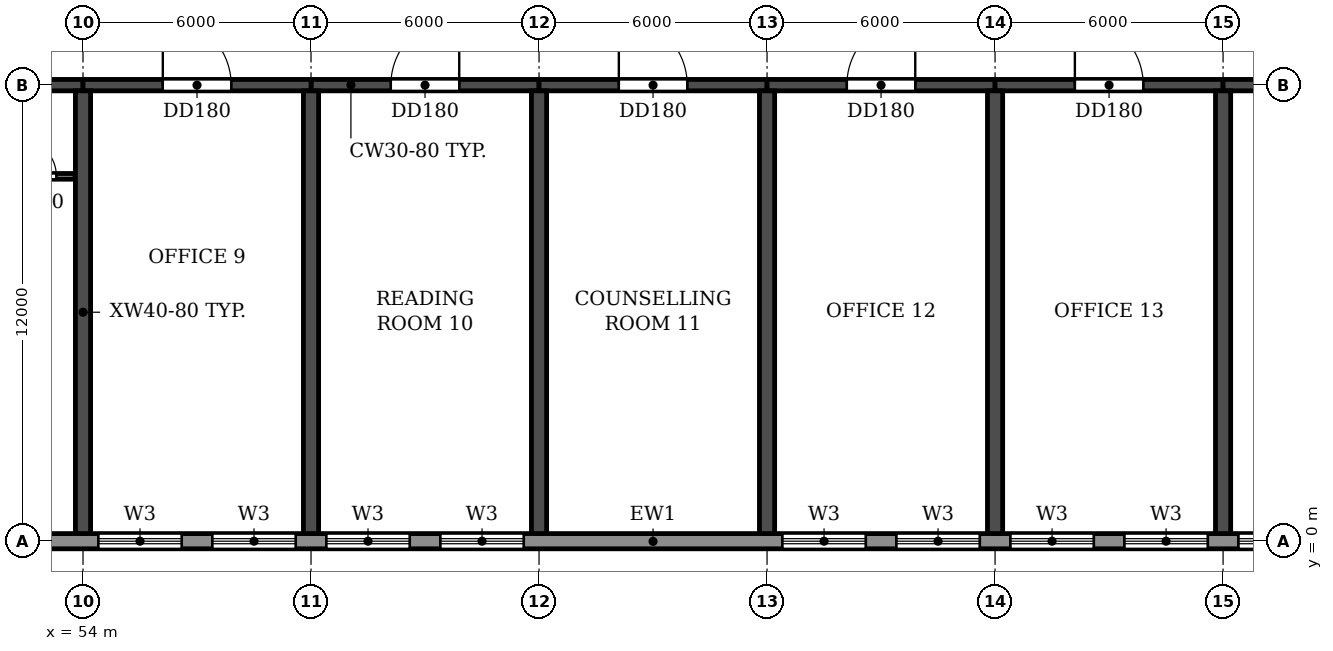
"""IFC4 building model, lengths in metres.
Left out: names, types, materials, properties, quantities, classifications, styles, units other than length and angle.
Written with IfcOpenShell. Run it as: python <this file> out.ifc"""

import sys

from ifc_helpers import new_model, si_unit, direction, frame, frame_2d, origin, place, context, subcontext, project, spatial, rectangle, extrude, element, fill, save


model = new_model("IFC4")
c1 = context("Model", 3, precision=1e-05, world=origin(), true_north=direction((0.0, 1.0)))
c2 = subcontext(c1, "Body", "Model", "MODEL_VIEW")
j1 = project(units=[si_unit("LENGTHUNIT", "METRE"), si_unit("PLANEANGLEUNIT", "RADIAN")], contexts=[c1])
p1 = place(None, origin())
s1 = spatial("IfcSite", under=j1, at=p1, CompositionType="ELEMENT")
p2 = place(p1, origin())
s2 = spatial("IfcBuilding", under=s1, at=p2, CompositionType="ELEMENT")
p3 = place(p2, frame((0.0, 0.0, 53.1)))
s3 = spatial("IfcBuildingStorey", under=s2, at=p3, CompositionType="ELEMENT", Elevation=53.1)
for number, where, z_axis, x_axis in (
    (1, (54.0, 0.2, 0.0), (0.0, 0.0, 1.0), (0.0, 1.0, 0.0)),
    (2, (60.0, 0.2, 0.0), (0.0, 0.0, 1.0), (0.0, 1.0, 0.0)),
    (3, (66.0, 0.2, 0.0), (0.0, 0.0, 1.0), (0.0, 1.0, 0.0)),
    (4, (72.0, 0.2, 0.0), (0.0, 0.0, 1.0), (0.0, 1.0, 0.0)),
    (5, (78.0, 0.2, 0.0), (0.0, 0.0, 1.0), (0.0, 1.0, 0.0)),
    (6, (84.0, 0.2, 0.0), (0.0, 0.0, 1.0), (0.0, 1.0, 0.0)),
):
    element("IfcWall", number, at=place(p3, frame(where, z_axis=z_axis, x_axis=x_axis)), inside=s3, PredefinedType="SHEAR", context=c2, shape_type="SweptSolid", body=[
        extrude(rectangle(XDim=11.65, YDim=0.4, at=frame_2d((5.825, 0.0))), origin(), (0.0, 0.0, 1.0), 3.05),
    ])
p4 = place(p3, frame((48.0, 12.0, 0.0), z_axis=(0.0, 0.0, 1.0), x_axis=(1.0, 0.0, 0.0)))
e7 = element("IfcWall", 7, at=p4, inside=s3, PredefinedType="SHEAR", context=c2, shape_type="SweptSolid", body=[
    extrude(rectangle(XDim=6.0, YDim=0.3, at=frame_2d((3.0, 0.0))), origin(), (0.0, 0.0, 1.0), 2.45),
])
p5 = place(p4, frame((2.55, 0.0, 0.0)))
e8 = element("IfcOpeningElement", 8, at=p5, cuts=e7, PredefinedType="OPENING", context=c2, shape_type="SweptSolid", body=[
    extrude(rectangle(XDim=0.9, YDim=2.1, at=frame_2d((0.45, 1.05))), frame((0.0, 0.16, 0.0), z_axis=(0.0, -1.0, 0.0), x_axis=(1.0, 0.0, 0.0)), (0.0, 0.0, 1.0), 0.32),
])
p6 = place(p3, frame((54.0, 12.0, 0.0), z_axis=(0.0, 0.0, 1.0), x_axis=(1.0, 0.0, 0.0)))
e9 = element("IfcWall", 9, at=p6, inside=s3, PredefinedType="SHEAR", context=c2, shape_type="SweptSolid", body=[
    extrude(rectangle(XDim=6.0, YDim=0.3, at=frame_2d((3.0, 0.0))), origin(), (0.0, 0.0, 1.0), 2.45),
])
p7 = place(p6, frame((2.1, 0.0, 0.0)))
e10 = element("IfcOpeningElement", 10, at=p7, cuts=e9, PredefinedType="OPENING", context=c2, shape_type="SweptSolid", body=[
    extrude(rectangle(XDim=1.8, YDim=2.1, at=frame_2d((0.9, 1.05))), frame((0.0, 0.16, 0.0), z_axis=(0.0, -1.0, 0.0), x_axis=(1.0, 0.0, 0.0)), (0.0, 0.0, 1.0), 0.32),
])
p8 = place(p3, frame((60.0, 12.0, 0.0), z_axis=(0.0, 0.0, 1.0), x_axis=(1.0, 0.0, 0.0)))
e11 = element("IfcWall", 11, at=p8, inside=s3, PredefinedType="SHEAR", context=c2, shape_type="SweptSolid", body=[
    extrude(rectangle(XDim=6.0, YDim=0.3, at=frame_2d((3.0, 0.0))), origin(), (0.0, 0.0, 1.0), 2.45),
])
p9 = place(p8, frame((2.1, 0.0, 0.0)))
e12 = element("IfcOpeningElement", 12, at=p9, cuts=e11, PredefinedType="OPENING", context=c2, shape_type="SweptSolid", body=[
    extrude(rectangle(XDim=1.8, YDim=2.1, at=frame_2d((0.9, 1.05))), frame((0.0, 0.16, 0.0), z_axis=(0.0, -1.0, 0.0), x_axis=(1.0, 0.0, 0.0)), (0.0, 0.0, 1.0), 0.32),
])
p10 = place(p3, frame((66.0, 12.0, 0.0), z_axis=(0.0, 0.0, 1.0), x_axis=(1.0, 0.0, 0.0)))
e13 = element("IfcWall", 13, at=p10, inside=s3, PredefinedType="SHEAR", context=c2, shape_type="SweptSolid", body=[
    extrude(rectangle(XDim=6.0, YDim=0.3, at=frame_2d((3.0, 0.0))), origin(), (0.0, 0.0, 1.0), 2.45),
])
p11 = place(p10, frame((2.1, 0.0, 0.0)))
e14 = element("IfcOpeningElement", 14, at=p11, cuts=e13, PredefinedType="OPENING", context=c2, shape_type="SweptSolid", body=[
    extrude(rectangle(XDim=1.8, YDim=2.1, at=frame_2d((0.9, 1.05))), frame((0.0, 0.16, 0.0), z_axis=(0.0, -1.0, 0.0), x_axis=(1.0, 0.0, 0.0)), (0.0, 0.0, 1.0), 0.32),
])
p12 = place(p3, frame((72.0, 12.0, 0.0), z_axis=(0.0, 0.0, 1.0), x_axis=(1.0, 0.0, 0.0)))
e15 = element("IfcWall", 15, at=p12, inside=s3, PredefinedType="SHEAR", context=c2, shape_type="SweptSolid", body=[
    extrude(rectangle(XDim=6.0, YDim=0.3, at=frame_2d((3.0, 0.0))), origin(), (0.0, 0.0, 1.0), 2.45),
])
p13 = place(p12, frame((2.1, 0.0, 0.0)))
e16 = element("IfcOpeningElement", 16, at=p13, cuts=e15, PredefinedType="OPENING", context=c2, shape_type="SweptSolid", body=[
    extrude(rectangle(XDim=1.8, YDim=2.1, at=frame_2d((0.9, 1.05))), frame((0.0, 0.16, 0.0), z_axis=(0.0, -1.0, 0.0), x_axis=(1.0, 0.0, 0.0)), (0.0, 0.0, 1.0), 0.32),
])
p14 = place(p3, frame((78.0, 12.0, 0.0), z_axis=(0.0, 0.0, 1.0), x_axis=(1.0, 0.0, 0.0)))
e17 = element("IfcWall", 17, at=p14, inside=s3, PredefinedType="SHEAR", context=c2, shape_type="SweptSolid", body=[
    extrude(rectangle(XDim=6.0, YDim=0.3, at=frame_2d((3.0, 0.0))), origin(), (0.0, 0.0, 1.0), 2.45),
])
p15 = place(p14, frame((2.1, 0.0, 0.0)))
e18 = element("IfcOpeningElement", 18, at=p15, cuts=e17, PredefinedType="OPENING", context=c2, shape_type="SweptSolid", body=[
    extrude(rectangle(XDim=1.8, YDim=2.1, at=frame_2d((0.9, 1.05))), frame((0.0, 0.16, 0.0), z_axis=(0.0, -1.0, 0.0), x_axis=(1.0, 0.0, 0.0)), (0.0, 0.0, 1.0), 0.32),
])
p16 = place(p3, frame((84.0, 12.0, 0.0), z_axis=(0.0, 0.0, 1.0), x_axis=(1.0, 0.0, 0.0)))
e19 = element("IfcWall", 19, at=p16, inside=s3, PredefinedType="SHEAR", context=c2, shape_type="SweptSolid", body=[
    extrude(rectangle(XDim=6.0, YDim=0.3, at=frame_2d((3.0, 0.0))), origin(), (0.0, 0.0, 1.0), 2.45),
])
p17 = place(p16, frame((2.1, 0.0, 0.0)))
e20 = element("IfcOpeningElement", 20, at=p17, cuts=e19, PredefinedType="OPENING", context=c2, shape_type="SweptSolid", body=[
    extrude(rectangle(XDim=1.8, YDim=2.1, at=frame_2d((0.9, 1.05))), frame((0.0, 0.16, 0.0), z_axis=(0.0, -1.0, 0.0), x_axis=(1.0, 0.0, 0.0)), (0.0, 0.0, 1.0), 0.32),
])
p18 = place(p3, frame((10.683, 0.0, 0.0), z_axis=(0.0, 0.0, 1.0), x_axis=(1.0, 0.0, 0.0)))
e21 = element("IfcWall", 21, at=p18, inside=s3, PredefinedType="STANDARD", context=c2, shape_type="SweptSolid", body=[
    extrude(rectangle(XDim=80.634, YDim=0.4, at=frame_2d((40.317, 0.0))), origin(), (0.0, 0.0, 1.0), 3.05),
])
p19 = place(p18, frame((1.717, 0.0, 0.6)))
e22 = element("IfcOpeningElement", 22, at=p19, cuts=e21, PredefinedType="OPENING", context=c2, shape_type="SweptSolid", body=[
    extrude(rectangle(XDim=2.2, YDim=1.8, at=frame_2d((1.1, 0.9))), frame((0.0, 0.21, 0.0), z_axis=(0.0, -1.0, 0.0), x_axis=(1.0, 0.0, 0.0)), (0.0, 0.0, 1.0), 0.42),
])
p20 = place(p18, frame((4.717, 0.0, 0.6)))
e23 = element("IfcOpeningElement", 23, at=p20, cuts=e21, PredefinedType="OPENING", context=c2, shape_type="SweptSolid", body=[
    extrude(rectangle(XDim=2.2, YDim=1.8, at=frame_2d((1.1, 0.9))), frame((0.0, 0.21, 0.0), z_axis=(0.0, -1.0, 0.0), x_axis=(1.0, 0.0, 0.0)), (0.0, 0.0, 1.0), 0.42),
])
p21 = place(p18, frame((7.717, 0.0, 0.6)))
e24 = element("IfcOpeningElement", 24, at=p21, cuts=e21, PredefinedType="OPENING", context=c2, shape_type="SweptSolid", body=[
    extrude(rectangle(XDim=2.2, YDim=1.8, at=frame_2d((1.1, 0.9))), frame((0.0, 0.21, 0.0), z_axis=(0.0, -1.0, 0.0), x_axis=(1.0, 0.0, 0.0)), (0.0, 0.0, 1.0), 0.42),
])
p22 = place(p18, frame((10.717, 0.0, 0.6)))
e25 = element("IfcOpeningElement", 25, at=p22, cuts=e21, PredefinedType="OPENING", context=c2, shape_type="SweptSolid", body=[
    extrude(rectangle(XDim=2.2, YDim=1.8, at=frame_2d((1.1, 0.9))), frame((0.0, 0.21, 0.0), z_axis=(0.0, -1.0, 0.0), x_axis=(1.0, 0.0, 0.0)), (0.0, 0.0, 1.0), 0.42),
])
p23 = place(p18, frame((13.717, 0.0, 0.6)))
e26 = element("IfcOpeningElement", 26, at=p23, cuts=e21, PredefinedType="OPENING", context=c2, shape_type="SweptSolid", body=[
    extrude(rectangle(XDim=2.2, YDim=1.8, at=frame_2d((1.1, 0.9))), frame((0.0, 0.21, 0.0), z_axis=(0.0, -1.0, 0.0), x_axis=(1.0, 0.0, 0.0)), (0.0, 0.0, 1.0), 0.42),
])
p24 = place(p18, frame((16.717, 0.0, 0.6)))
e27 = element("IfcOpeningElement", 27, at=p24, cuts=e21, PredefinedType="OPENING", context=c2, shape_type="SweptSolid", body=[
    extrude(rectangle(XDim=2.2, YDim=1.8, at=frame_2d((1.1, 0.9))), frame((0.0, 0.21, 0.0), z_axis=(0.0, -1.0, 0.0), x_axis=(1.0, 0.0, 0.0)), (0.0, 0.0, 1.0), 0.42),
])
p25 = place(p18, frame((19.717, 0.0, 0.6)))
e28 = element("IfcOpeningElement", 28, at=p25, cuts=e21, PredefinedType="OPENING", context=c2, shape_type="SweptSolid", body=[
    extrude(rectangle(XDim=2.2, YDim=1.8, at=frame_2d((1.1, 0.9))), frame((0.0, 0.21, 0.0), z_axis=(0.0, -1.0, 0.0), x_axis=(1.0, 0.0, 0.0)), (0.0, 0.0, 1.0), 0.42),
])
p26 = place(p18, frame((22.717, 0.0, 0.6)))
e29 = element("IfcOpeningElement", 29, at=p26, cuts=e21, PredefinedType="OPENING", context=c2, shape_type="SweptSolid", body=[
    extrude(rectangle(XDim=2.2, YDim=1.8, at=frame_2d((1.1, 0.9))), frame((0.0, 0.21, 0.0), z_axis=(0.0, -1.0, 0.0), x_axis=(1.0, 0.0, 0.0)), (0.0, 0.0, 1.0), 0.42),
])
p27 = place(p18, frame((25.717, 0.0, 0.6)))
e30 = element("IfcOpeningElement", 30, at=p27, cuts=e21, PredefinedType="OPENING", context=c2, shape_type="SweptSolid", body=[
    extrude(rectangle(XDim=2.2, YDim=1.8, at=frame_2d((1.1, 0.9))), frame((0.0, 0.21, 0.0), z_axis=(0.0, -1.0, 0.0), x_axis=(1.0, 0.0, 0.0)), (0.0, 0.0, 1.0), 0.42),
])
p28 = place(p18, frame((28.717, 0.0, 0.6)))
e31 = element("IfcOpeningElement", 31, at=p28, cuts=e21, PredefinedType="OPENING", context=c2, shape_type="SweptSolid", body=[
    extrude(rectangle(XDim=2.2, YDim=1.8, at=frame_2d((1.1, 0.9))), frame((0.0, 0.21, 0.0), z_axis=(0.0, -1.0, 0.0), x_axis=(1.0, 0.0, 0.0)), (0.0, 0.0, 1.0), 0.42),
])
p29 = place(p18, frame((31.717, 0.0, 0.6)))
e32 = element("IfcOpeningElement", 32, at=p29, cuts=e21, PredefinedType="OPENING", context=c2, shape_type="SweptSolid", body=[
    extrude(rectangle(XDim=2.2, YDim=1.8, at=frame_2d((1.1, 0.9))), frame((0.0, 0.21, 0.0), z_axis=(0.0, -1.0, 0.0), x_axis=(1.0, 0.0, 0.0)), (0.0, 0.0, 1.0), 0.42),
])
p30 = place(p18, frame((34.717, 0.0, 0.6)))
e33 = element("IfcOpeningElement", 33, at=p30, cuts=e21, PredefinedType="OPENING", context=c2, shape_type="SweptSolid", body=[
    extrude(rectangle(XDim=2.2, YDim=1.8, at=frame_2d((1.1, 0.9))), frame((0.0, 0.21, 0.0), z_axis=(0.0, -1.0, 0.0), x_axis=(1.0, 0.0, 0.0)), (0.0, 0.0, 1.0), 0.42),
])
p31 = place(p18, frame((43.717, 0.0, 0.6)))
e34 = element("IfcOpeningElement", 34, at=p31, cuts=e21, PredefinedType="OPENING", context=c2, shape_type="SweptSolid", body=[
    extrude(rectangle(XDim=2.2, YDim=1.8, at=frame_2d((1.1, 0.9))), frame((0.0, 0.21, 0.0), z_axis=(0.0, -1.0, 0.0), x_axis=(1.0, 0.0, 0.0)), (0.0, 0.0, 1.0), 0.42),
])
p32 = place(p18, frame((46.717, 0.0, 0.6)))
e35 = element("IfcOpeningElement", 35, at=p32, cuts=e21, PredefinedType="OPENING", context=c2, shape_type="SweptSolid", body=[
    extrude(rectangle(XDim=2.2, YDim=1.8, at=frame_2d((1.1, 0.9))), frame((0.0, 0.21, 0.0), z_axis=(0.0, -1.0, 0.0), x_axis=(1.0, 0.0, 0.0)), (0.0, 0.0, 1.0), 0.42),
])
p33 = place(p18, frame((49.717, 0.0, 0.6)))
e36 = element("IfcOpeningElement", 36, at=p33, cuts=e21, PredefinedType="OPENING", context=c2, shape_type="SweptSolid", body=[
    extrude(rectangle(XDim=2.2, YDim=1.8, at=frame_2d((1.1, 0.9))), frame((0.0, 0.21, 0.0), z_axis=(0.0, -1.0, 0.0), x_axis=(1.0, 0.0, 0.0)), (0.0, 0.0, 1.0), 0.42),
])
p34 = place(p18, frame((52.717, 0.0, 0.6)))
e37 = element("IfcOpeningElement", 37, at=p34, cuts=e21, PredefinedType="OPENING", context=c2, shape_type="SweptSolid", body=[
    extrude(rectangle(XDim=2.2, YDim=1.8, at=frame_2d((1.1, 0.9))), frame((0.0, 0.21, 0.0), z_axis=(0.0, -1.0, 0.0), x_axis=(1.0, 0.0, 0.0)), (0.0, 0.0, 1.0), 0.42),
])
p35 = place(p18, frame((61.717, 0.0, 0.6)))
e38 = element("IfcOpeningElement", 38, at=p35, cuts=e21, PredefinedType="OPENING", context=c2, shape_type="SweptSolid", body=[
    extrude(rectangle(XDim=2.2, YDim=1.8, at=frame_2d((1.1, 0.9))), frame((0.0, 0.21, 0.0), z_axis=(0.0, -1.0, 0.0), x_axis=(1.0, 0.0, 0.0)), (0.0, 0.0, 1.0), 0.42),
])
p36 = place(p18, frame((64.717, 0.0, 0.6)))
e39 = element("IfcOpeningElement", 39, at=p36, cuts=e21, PredefinedType="OPENING", context=c2, shape_type="SweptSolid", body=[
    extrude(rectangle(XDim=2.2, YDim=1.8, at=frame_2d((1.1, 0.9))), frame((0.0, 0.21, 0.0), z_axis=(0.0, -1.0, 0.0), x_axis=(1.0, 0.0, 0.0)), (0.0, 0.0, 1.0), 0.42),
])
p37 = place(p18, frame((67.717, 0.0, 0.6)))
e40 = element("IfcOpeningElement", 40, at=p37, cuts=e21, PredefinedType="OPENING", context=c2, shape_type="SweptSolid", body=[
    extrude(rectangle(XDim=2.2, YDim=1.8, at=frame_2d((1.1, 0.9))), frame((0.0, 0.21, 0.0), z_axis=(0.0, -1.0, 0.0), x_axis=(1.0, 0.0, 0.0)), (0.0, 0.0, 1.0), 0.42),
])
p38 = place(p18, frame((70.717, 0.0, 0.6)))
e41 = element("IfcOpeningElement", 41, at=p38, cuts=e21, PredefinedType="OPENING", context=c2, shape_type="SweptSolid", body=[
    extrude(rectangle(XDim=2.2, YDim=1.8, at=frame_2d((1.1, 0.9))), frame((0.0, 0.21, 0.0), z_axis=(0.0, -1.0, 0.0), x_axis=(1.0, 0.0, 0.0)), (0.0, 0.0, 1.0), 0.42),
])
p39 = place(p18, frame((73.717, 0.0, 0.6)))
e42 = element("IfcOpeningElement", 42, at=p39, cuts=e21, PredefinedType="OPENING", context=c2, shape_type="SweptSolid", body=[
    extrude(rectangle(XDim=2.2, YDim=1.8, at=frame_2d((1.1, 0.9))), frame((0.0, 0.21, 0.0), z_axis=(0.0, -1.0, 0.0), x_axis=(1.0, 0.0, 0.0)), (0.0, 0.0, 1.0), 0.42),
])
p40 = place(p18, frame((76.717, 0.0, 0.6)))
e43 = element("IfcOpeningElement", 43, at=p40, cuts=e21, PredefinedType="OPENING", context=c2, shape_type="SweptSolid", body=[
    extrude(rectangle(XDim=2.2, YDim=1.8, at=frame_2d((1.1, 0.9))), frame((0.0, 0.21, 0.0), z_axis=(0.0, -1.0, 0.0), x_axis=(1.0, 0.0, 0.0)), (0.0, 0.0, 1.0), 0.42),
])
p41 = place(p3, frame((48.21, 9.6, 0.0), z_axis=(0.0, 0.0, 1.0), x_axis=(1.0, 0.0, 0.0)))
e44 = element("IfcWall", 44, at=p41, inside=s3, PredefinedType="PARTITIONING", context=c2, shape_type="SweptSolid", body=[
    extrude(rectangle(XDim=5.58, YDim=0.15, at=frame_2d((2.79, 0.0))), origin(), (0.0, 0.0, 1.0), 3.05),
])
p42 = place(p41, frame((1.09, 0.0, 0.0)))
e45 = element("IfcOpeningElement", 45, at=p42, cuts=e44, PredefinedType="OPENING", context=c2, shape_type="SweptSolid", body=[
    extrude(rectangle(XDim=1.0, YDim=2.1, at=frame_2d((0.5, 1.05))), frame((0.0, 0.085, 0.0), z_axis=(0.0, -1.0, 0.0), x_axis=(1.0, 0.0, 0.0)), (0.0, 0.0, 1.0), 0.17),
])
p43 = place(p41, frame((4.09, 0.0, 0.0)))
e46 = element("IfcOpeningElement", 46, at=p43, cuts=e44, PredefinedType="OPENING", context=c2, shape_type="SweptSolid", body=[
    extrude(rectangle(XDim=1.0, YDim=2.1, at=frame_2d((0.5, 1.05))), frame((0.0, 0.085, 0.0), z_axis=(0.0, -1.0, 0.0), x_axis=(1.0, 0.0, 0.0)), (0.0, 0.0, 1.0), 0.17),
])
p44 = place(p31, origin())
e47 = element("IfcWindow", 47, at=p44, inside=s3, PartitioningType="DOUBLE_PANEL_HORIZONTAL", PredefinedType="WINDOW", context=c2, shape_type="SweptSolid", body=[
    extrude(rectangle(XDim=2.2, YDim=1.8, at=frame_2d((1.1, 0.9))), frame((0.0, 0.03, 0.0), z_axis=(0.0, -1.0, 0.0), x_axis=(1.0, 0.0, 0.0)), (0.0, 0.0, 1.0), 0.06),
])
fill(e34, e47)
p45 = place(p32, origin())
e48 = element("IfcWindow", 48, at=p45, inside=s3, PartitioningType="DOUBLE_PANEL_HORIZONTAL", PredefinedType="WINDOW", context=c2, shape_type="SweptSolid", body=[
    extrude(rectangle(XDim=2.2, YDim=1.8, at=frame_2d((1.1, 0.9))), frame((0.0, 0.03, 0.0), z_axis=(0.0, -1.0, 0.0), x_axis=(1.0, 0.0, 0.0)), (0.0, 0.0, 1.0), 0.06),
])
fill(e35, e48)
p46 = place(p33, origin())
e49 = element("IfcWindow", 49, at=p46, inside=s3, PartitioningType="DOUBLE_PANEL_HORIZONTAL", PredefinedType="WINDOW", context=c2, shape_type="SweptSolid", body=[
    extrude(rectangle(XDim=2.2, YDim=1.8, at=frame_2d((1.1, 0.9))), frame((0.0, 0.03, 0.0), z_axis=(0.0, -1.0, 0.0), x_axis=(1.0, 0.0, 0.0)), (0.0, 0.0, 1.0), 0.06),
])
fill(e36, e49)
p47 = place(p34, origin())
e50 = element("IfcWindow", 50, at=p47, inside=s3, PartitioningType="DOUBLE_PANEL_HORIZONTAL", PredefinedType="WINDOW", context=c2, shape_type="SweptSolid", body=[
    extrude(rectangle(XDim=2.2, YDim=1.8, at=frame_2d((1.1, 0.9))), frame((0.0, 0.03, 0.0), z_axis=(0.0, -1.0, 0.0), x_axis=(1.0, 0.0, 0.0)), (0.0, 0.0, 1.0), 0.06),
])
fill(e37, e50)
p48 = place(p35, origin())
e51 = element("IfcWindow", 51, at=p48, inside=s3, PartitioningType="DOUBLE_PANEL_HORIZONTAL", PredefinedType="WINDOW", context=c2, shape_type="SweptSolid", body=[
    extrude(rectangle(XDim=2.2, YDim=1.8, at=frame_2d((1.1, 0.9))), frame((0.0, 0.03, 0.0), z_axis=(0.0, -1.0, 0.0), x_axis=(1.0, 0.0, 0.0)), (0.0, 0.0, 1.0), 0.06),
])
fill(e38, e51)
p49 = place(p36, origin())
e52 = element("IfcWindow", 52, at=p49, inside=s3, PartitioningType="DOUBLE_PANEL_HORIZONTAL", PredefinedType="WINDOW", context=c2, shape_type="SweptSolid", body=[
    extrude(rectangle(XDim=2.2, YDim=1.8, at=frame_2d((1.1, 0.9))), frame((0.0, 0.03, 0.0), z_axis=(0.0, -1.0, 0.0), x_axis=(1.0, 0.0, 0.0)), (0.0, 0.0, 1.0), 0.06),
])
fill(e39, e52)
p50 = place(p37, origin())
e53 = element("IfcWindow", 53, at=p50, inside=s3, PartitioningType="DOUBLE_PANEL_HORIZONTAL", PredefinedType="WINDOW", context=c2, shape_type="SweptSolid", body=[
    extrude(rectangle(XDim=2.2, YDim=1.8, at=frame_2d((1.1, 0.9))), frame((0.0, 0.03, 0.0), z_axis=(0.0, -1.0, 0.0), x_axis=(1.0, 0.0, 0.0)), (0.0, 0.0, 1.0), 0.06),
])
fill(e40, e53)
p51 = place(p38, origin())
e54 = element("IfcWindow", 54, at=p51, inside=s3, PartitioningType="DOUBLE_PANEL_HORIZONTAL", PredefinedType="WINDOW", context=c2, shape_type="SweptSolid", body=[
    extrude(rectangle(XDim=2.2, YDim=1.8, at=frame_2d((1.1, 0.9))), frame((0.0, 0.03, 0.0), z_axis=(0.0, -1.0, 0.0), x_axis=(1.0, 0.0, 0.0)), (0.0, 0.0, 1.0), 0.06),
])
fill(e41, e54)
p52 = place(p39, origin())
e55 = element("IfcWindow", 55, at=p52, inside=s3, PartitioningType="DOUBLE_PANEL_HORIZONTAL", PredefinedType="WINDOW", context=c2, shape_type="SweptSolid", body=[
    extrude(rectangle(XDim=2.2, YDim=1.8, at=frame_2d((1.1, 0.9))), frame((0.0, 0.03, 0.0), z_axis=(0.0, -1.0, 0.0), x_axis=(1.0, 0.0, 0.0)), (0.0, 0.0, 1.0), 0.06),
])
fill(e42, e55)
p53 = place(p7, origin())
e56 = element("IfcDoor", 56, at=p53, inside=s3, OperationType="DOUBLE_DOOR_SINGLE_SWING", PredefinedType="DOOR", context=c2, shape_type="SweptSolid", body=[
    extrude(rectangle(XDim=1.8, YDim=2.1, at=frame_2d((0.9, 1.05))), frame((0.0, 0.025, 0.0), z_axis=(0.0, -1.0, 0.0), x_axis=(1.0, 0.0, 0.0)), (0.0, 0.0, 1.0), 0.05),
])
fill(e10, e56)
p54 = place(p9, origin())
e57 = element("IfcDoor", 57, at=p54, inside=s3, OperationType="DOUBLE_DOOR_SINGLE_SWING", PredefinedType="DOOR", context=c2, shape_type="SweptSolid", body=[
    extrude(rectangle(XDim=1.8, YDim=2.1, at=frame_2d((0.9, 1.05))), frame((0.0, 0.025, 0.0), z_axis=(0.0, -1.0, 0.0), x_axis=(1.0, 0.0, 0.0)), (0.0, 0.0, 1.0), 0.05),
])
fill(e12, e57)
p55 = place(p11, origin())
e58 = element("IfcDoor", 58, at=p55, inside=s3, OperationType="DOUBLE_DOOR_SINGLE_SWING", PredefinedType="DOOR", context=c2, shape_type="SweptSolid", body=[
    extrude(rectangle(XDim=1.8, YDim=2.1, at=frame_2d((0.9, 1.05))), frame((0.0, 0.025, 0.0), z_axis=(0.0, -1.0, 0.0), x_axis=(1.0, 0.0, 0.0)), (0.0, 0.0, 1.0), 0.05),
])
fill(e14, e58)
p56 = place(p13, origin())
e59 = element("IfcDoor", 59, at=p56, inside=s3, OperationType="DOUBLE_DOOR_SINGLE_SWING", PredefinedType="DOOR", context=c2, shape_type="SweptSolid", body=[
    extrude(rectangle(XDim=1.8, YDim=2.1, at=frame_2d((0.9, 1.05))), frame((0.0, 0.025, 0.0), z_axis=(0.0, -1.0, 0.0), x_axis=(1.0, 0.0, 0.0)), (0.0, 0.0, 1.0), 0.05),
])
fill(e16, e59)
p57 = place(p15, origin())
e60 = element("IfcDoor", 60, at=p57, inside=s3, OperationType="DOUBLE_DOOR_SINGLE_SWING", PredefinedType="DOOR", context=c2, shape_type="SweptSolid", body=[
    extrude(rectangle(XDim=1.8, YDim=2.1, at=frame_2d((0.9, 1.05))), frame((0.0, 0.025, 0.0), z_axis=(0.0, -1.0, 0.0), x_axis=(1.0, 0.0, 0.0)), (0.0, 0.0, 1.0), 0.05),
])
fill(e18, e60)
p58 = place(p43, origin())
e61 = element("IfcDoor", 61, at=p58, inside=s3, OperationType="SINGLE_SWING_LEFT", PredefinedType="DOOR", context=c2, shape_type="SweptSolid", body=[
    extrude(rectangle(XDim=1.0, YDim=2.1, at=frame_2d((0.5, 1.05))), frame((0.0, 0.025, 0.0), z_axis=(0.0, -1.0, 0.0), x_axis=(1.0, 0.0, 0.0)), (0.0, 0.0, 1.0), 0.05),
])
fill(e46, e61)
save(model, sys.argv[1])
